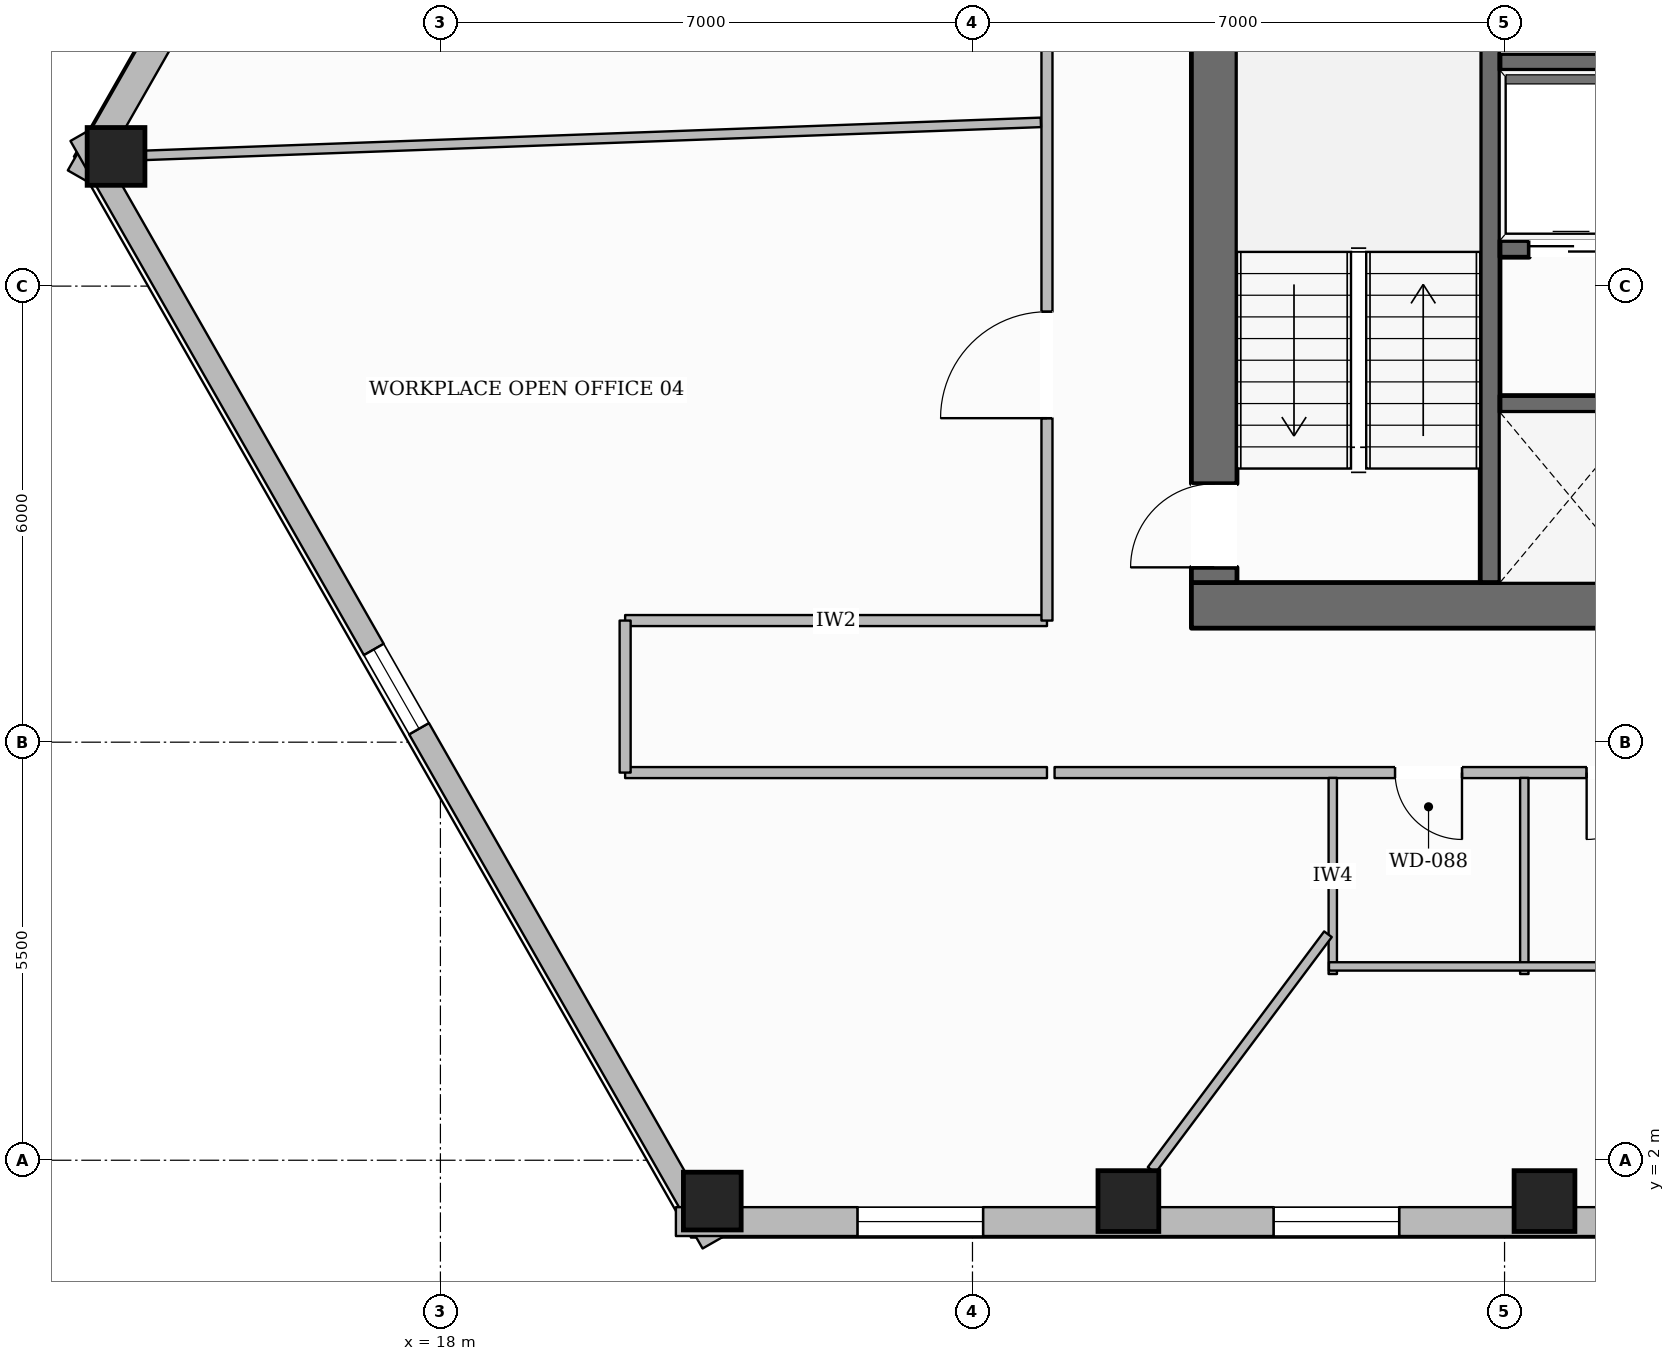
"""IFC4 building model, lengths in metres.
Left out: names, types, materials, properties, quantities, classifications, styles, units other than length and angle.
Written with IfcOpenShell. Run it as: python <this file> out.ifc"""

import sys

from ifc_helpers import new_model, si_unit, direction, frame, frame_2d, origin, origin_2d, place, context, subcontext, project, spatial, rectangle, hollow_rectangle, extrude, element, fill, save


model = new_model("IFC4")
c1 = context("Model", 3, precision=1e-05, world=origin(), true_north=direction((0.0, 1.0)))
c2 = subcontext(c1, "Body", "Model", "MODEL_VIEW")
j1 = project(units=[si_unit("LENGTHUNIT", "METRE"), si_unit("PLANEANGLEUNIT", "RADIAN")], contexts=[c1])
p1 = place(None, origin())
s1 = spatial("IfcSite", under=j1, at=p1, CompositionType="ELEMENT")
p2 = place(p1, origin())
s2 = spatial("IfcBuilding", under=s1, at=p2, CompositionType="ELEMENT")
p3 = place(p2, frame((0.0, 0.0, 25.25)))
s3 = spatial("IfcBuildingStorey", under=s2, at=p3, CompositionType="ELEMENT", Elevation=25.25)
p4 = place(p3, frame((27.88, 9.3, 0.0), z_axis=(0.0, 0.0, 1.0), x_axis=(1.0, 0.0, 0.0)))
e1 = element("IfcWall", 1, at=p4, inside=s3, PredefinedType="SOLIDWALL", context=c2, shape_type="SweptSolid", body=[
    extrude(rectangle(XDim=20.24, YDim=0.6, at=frame_2d((10.12, 0.0))), origin(), (0.0, 0.0, 1.0), 3.59),
])
p5 = place(p4, frame((10.62, 0.0, 0.0)))
e2 = element("IfcOpeningElement", 2, at=p5, cuts=e1, PredefinedType="OPENING", context=c2, shape_type="SweptSolid", body=[
    extrude(rectangle(XDim=1.4, YDim=2.2, at=frame_2d((0.7, 1.1))), frame((0.0, 0.31, 0.0), z_axis=(0.0, -1.0, 0.0), x_axis=(1.0, 0.0, 0.0)), (0.0, 0.0, 1.0), 0.62),
])
p6 = place(p3, frame((28.18, 9.6, 0.0), z_axis=(0.0, 0.0, 1.0), x_axis=(0.0, 1.0, 0.0)))
e3 = element("IfcWall", 3, at=p6, inside=s3, PredefinedType="SOLIDWALL", context=c2, shape_type="SweptSolid", body=[
    extrude(rectangle(XDim=13.0, YDim=0.6, at=frame_2d((6.5, 0.0))), origin(), (0.0, 0.0, 1.0), 3.59),
])
p7 = place(p6, frame((0.2, 0.0, 0.0)))
e4 = element("IfcOpeningElement", 4, at=p7, cuts=e3, PredefinedType="OPENING", context=c2, shape_type="SweptSolid", body=[
    extrude(rectangle(XDim=1.1, YDim=2.15, at=frame_2d((0.55, 1.075))), frame((0.0, 0.31, 0.0), z_axis=(0.0, -1.0, 0.0), x_axis=(1.0, 0.0, 0.0)), (0.0, 0.0, 1.0), 0.62),
])
p8 = place(p6, frame((8.4, 0.0, 0.0)))
e5 = element("IfcOpeningElement", 5, at=p8, cuts=e3, PredefinedType="OPENING", context=c2, shape_type="SweptSolid", body=[
    extrude(rectangle(XDim=0.9, YDim=2.1, at=frame_2d((0.45, 1.05))), frame((0.0, 0.31, 0.0), z_axis=(0.0, -1.0, 0.0), x_axis=(1.0, 0.0, 0.0)), (0.0, 0.0, 1.0), 0.62),
])
p9 = place(p3, frame((31.81, 9.6, 0.0), z_axis=(0.0, 0.0, 1.0), x_axis=(0.0, 1.0, 0.0)))
e6 = element("IfcWall", 6, at=p9, inside=s3, PredefinedType="SHEAR", context=c2, shape_type="SweptSolid", body=[
    extrude(rectangle(XDim=13.0, YDim=0.26, at=frame_2d((6.5, 0.0))), origin(), (0.0, 0.0, 1.0), 3.59),
])
p10 = place(p9, frame((10.925, 0.0, 0.0)))
e7 = element("IfcOpeningElement", 7, at=p10, cuts=e6, PredefinedType="OPENING", context=c2, shape_type="SweptSolid", body=[
    extrude(rectangle(XDim=1.25, YDim=2.25, at=frame_2d((0.625, 1.125))), frame((0.0, 0.14, 0.0), z_axis=(0.0, -1.0, 0.0), x_axis=(1.0, 0.0, 0.0)), (0.0, 0.0, 1.0), 0.28),
])
p11 = place(p3, frame((31.94, 16.45, 0.0), z_axis=(0.0, 0.0, 1.0), x_axis=(1.0, 0.0, 0.0)))
e8 = element("IfcWall", 8, at=p11, inside=s3, PredefinedType="SOLIDWALL", context=c2, shape_type="SweptSolid", body=[
    extrude(rectangle(XDim=12.12, YDim=0.22, at=frame_2d((6.06, 0.0))), origin(), (0.0, 0.0, 1.0), 3.59),
])
p12 = place(p3, frame((31.94, 13.99, 0.0), z_axis=(0.0, 0.0, 1.0), x_axis=(1.0, 0.0, 0.0)))
e9 = element("IfcWall", 9, at=p12, inside=s3, PredefinedType="SOLIDWALL", context=c2, shape_type="SweptSolid", body=[
    extrude(rectangle(XDim=12.12, YDim=0.22, at=frame_2d((6.06, 0.0))), origin(), (0.0, 0.0, 1.0), 3.59),
])
p13 = place(p12, frame((0.385, 0.0, 0.0)))
e10 = element("IfcOpeningElement", 10, at=p13, cuts=e9, PredefinedType="OPENING", context=c2, shape_type="SweptSolid", body=[
    extrude(rectangle(XDim=1.1, YDim=2.2, at=frame_2d((0.55, 1.1))), frame((0.0, 0.12, 0.0), z_axis=(0.0, -1.0, 0.0), x_axis=(1.0, 0.0, 0.0)), (0.0, 0.0, 1.0), 0.24),
])
p14 = place(p12, frame((2.435, 0.0, 0.0)))
e11 = element("IfcOpeningElement", 11, at=p14, cuts=e9, PredefinedType="OPENING", context=c2, shape_type="SweptSolid", body=[
    extrude(rectangle(XDim=1.1, YDim=2.2, at=frame_2d((0.55, 1.1))), frame((0.0, 0.12, 0.0), z_axis=(0.0, -1.0, 0.0), x_axis=(1.0, 0.0, 0.0)), (0.0, 0.0, 1.0), 0.24),
])
p15 = place(p12, frame((4.485, 0.0, 0.0)))
e12 = element("IfcOpeningElement", 12, at=p15, cuts=e9, PredefinedType="OPENING", context=c2, shape_type="SweptSolid", body=[
    extrude(rectangle(XDim=1.1, YDim=2.2, at=frame_2d((0.55, 1.1))), frame((0.0, 0.12, 0.0), z_axis=(0.0, -1.0, 0.0), x_axis=(1.0, 0.0, 0.0)), (0.0, 0.0, 1.0), 0.24),
])
p16 = place(p3, frame((31.94, 11.95, 0.0), z_axis=(0.0, 0.0, 1.0), x_axis=(1.0, 0.0, 0.0)))
e13 = element("IfcWall", 13, at=p16, inside=s3, PredefinedType="SOLIDWALL", context=c2, shape_type="SweptSolid", body=[
    extrude(rectangle(XDim=6.19, YDim=0.22, at=frame_2d((3.095, 0.0))), origin(), (0.0, 0.0, 1.0), 3.59),
])
for number, where, z_axis, x_axis in (
    (14, (13.733, 15.206, 0.0), (0.0, 0.0, 1.0), (1.0, 0.0, 0.0)),
    (15, (21.577, 1.463, 0.0), (0.0, 0.0, 1.0), (1.0, 0.0, 0.0)),
):
    element("IfcColumn", number, at=place(p3, frame(where, z_axis=z_axis, x_axis=x_axis)), inside=s3, PredefinedType="COLUMN", context=c2, shape_type="SweptSolid", body=[
        extrude(hollow_rectangle(XDim=0.76, YDim=0.76, WallThickness=0.035, at=origin_2d()), origin(), (0.0, 0.0, 1.0), 3.59),
    ])
for number, where, z_axis, x_axis in (
    (16, (27.051, 1.463, 0.0), (0.0, 0.0, 1.0), (1.0, 0.0, 0.0)),
    (17, (32.526, 1.463, 0.0), (0.0, 0.0, 1.0), (1.0, 0.0, 0.0)),
):
    element("IfcColumn", number, at=place(p3, frame(where, z_axis=z_axis, x_axis=x_axis)), inside=s3, PredefinedType="COLUMN", context=c2, shape_type="SweptSolid", body=[
        extrude(hollow_rectangle(XDim=0.8, YDim=0.8, WallThickness=0.036, at=origin_2d()), origin(), (0.0, 0.0, 1.0), 3.59),
    ])
p17 = place(p3, frame((13.263, 14.928, 0.0), z_axis=(0.0, 0.0, 1.0), x_axis=(0.495711630902, 0.868487178367, 0.0)))
e18 = element("IfcWall", 18, at=p17, inside=s3, PredefinedType="STANDARD", context=c2, shape_type="SweptSolid", body=[
    extrude(rectangle(XDim=34.092, YDim=0.38, at=frame_2d((17.046, 0.0))), origin(), (0.0, 0.0, 1.0), 2.97),
])
p18 = place(p17, frame((30.027, 0.0, 0.65)))
e19 = element("IfcOpeningElement", 19, at=p18, cuts=e18, PredefinedType="OPENING", context=c2, shape_type="SweptSolid", body=[
    extrude(rectangle(XDim=1.65, YDim=1.75, at=frame_2d((0.825, 0.875))), frame((0.0, 0.2, 0.0), z_axis=(0.0, -1.0, 0.0), x_axis=(1.0, 0.0, 0.0)), (0.0, 0.0, 1.0), 0.4),
])
p19 = place(p17, frame((24.504, 0.0, 0.65)))
e20 = element("IfcOpeningElement", 20, at=p19, cuts=e18, PredefinedType="OPENING", context=c2, shape_type="SweptSolid", body=[
    extrude(rectangle(XDim=1.65, YDim=1.75, at=frame_2d((0.825, 0.875))), frame((0.0, 0.2, 0.0), z_axis=(0.0, -1.0, 0.0), x_axis=(1.0, 0.0, 0.0)), (0.0, 0.0, 1.0), 0.4),
])
p20 = place(p17, frame((13.457, 0.0, 0.65)))
e21 = element("IfcOpeningElement", 21, at=p20, cuts=e18, PredefinedType="OPENING", context=c2, shape_type="SweptSolid", body=[
    extrude(rectangle(XDim=1.65, YDim=1.75, at=frame_2d((0.825, 0.875))), frame((0.0, 0.2, 0.0), z_axis=(0.0, -1.0, 0.0), x_axis=(1.0, 0.0, 0.0)), (0.0, 0.0, 1.0), 0.4),
])
p21 = place(p17, frame((7.934, 0.0, 0.65)))
e22 = element("IfcOpeningElement", 22, at=p21, cuts=e18, PredefinedType="OPENING", context=c2, shape_type="SweptSolid", body=[
    extrude(rectangle(XDim=1.65, YDim=1.75, at=frame_2d((0.825, 0.875))), frame((0.0, 0.2, 0.0), z_axis=(0.0, -1.0, 0.0), x_axis=(1.0, 0.0, 0.0)), (0.0, 0.0, 1.0), 0.4),
])
p22 = place(p17, frame((2.411, 0.0, 0.65)))
e23 = element("IfcOpeningElement", 23, at=p22, cuts=e18, PredefinedType="OPENING", context=c2, shape_type="SweptSolid", body=[
    extrude(rectangle(XDim=1.65, YDim=1.75, at=frame_2d((0.825, 0.875))), frame((0.0, 0.2, 0.0), z_axis=(0.0, -1.0, 0.0), x_axis=(1.0, 0.0, 0.0)), (0.0, 0.0, 1.0), 0.4),
])
p23 = place(p3, frame((21.58, 0.913, 0.0), z_axis=(0.0, 0.0, 1.0), x_axis=(-0.495706340457, 0.868490198005, 0.0)))
e24 = element("IfcWall", 24, at=p23, inside=s3, PredefinedType="STANDARD", context=c2, shape_type="SweptSolid", body=[
    extrude(rectangle(XDim=16.777, YDim=0.3, at=frame_2d((8.388, 0.0))), origin(), (0.0, 0.0, 1.0), 2.97),
])
p24 = place(p23, frame((7.789, 0.0, 0.65)))
e25 = element("IfcOpeningElement", 25, at=p24, cuts=e24, PredefinedType="OPENING", context=c2, shape_type="SweptSolid", body=[
    extrude(rectangle(XDim=1.2, YDim=1.7, at=frame_2d((0.6, 0.85))), frame((0.0, 0.16, 0.0), z_axis=(0.0, -1.0, 0.0), x_axis=(1.0, 0.0, 0.0)), (0.0, 0.0, 1.0), 0.32),
])
p25 = place(p3, frame((54.902, 1.193, 0.0), z_axis=(0.0, 0.0, 1.0), x_axis=(-1.0, 0.0, 0.0)))
e26 = element("IfcWall", 26, at=p25, inside=s3, PredefinedType="STANDARD", context=c2, shape_type="SweptSolid", body=[
    extrude(rectangle(XDim=33.804, YDim=0.38, at=frame_2d((16.902, 0.0))), origin(), (0.0, 0.0, 1.0), 2.97),
])
p26 = place(p25, frame((29.763, 0.0, 0.65)))
e27 = element("IfcOpeningElement", 27, at=p26, cuts=e26, PredefinedType="OPENING", context=c2, shape_type="SweptSolid", body=[
    extrude(rectangle(XDim=1.65, YDim=1.75, at=frame_2d((0.825, 0.875))), frame((0.0, 0.2, 0.0), z_axis=(0.0, -1.0, 0.0), x_axis=(1.0, 0.0, 0.0)), (0.0, 0.0, 1.0), 0.4),
])
p27 = place(p25, frame((24.288, 0.0, 0.65)))
e28 = element("IfcOpeningElement", 28, at=p27, cuts=e26, PredefinedType="OPENING", context=c2, shape_type="SweptSolid", body=[
    extrude(rectangle(XDim=1.65, YDim=1.75, at=frame_2d((0.825, 0.875))), frame((0.0, 0.2, 0.0), z_axis=(0.0, -1.0, 0.0), x_axis=(1.0, 0.0, 0.0)), (0.0, 0.0, 1.0), 0.4),
])
p28 = place(p25, frame((13.34, 0.0, 0.65)))
e29 = element("IfcOpeningElement", 29, at=p28, cuts=e26, PredefinedType="OPENING", context=c2, shape_type="SweptSolid", body=[
    extrude(rectangle(XDim=1.65, YDim=1.75, at=frame_2d((0.825, 0.875))), frame((0.0, 0.2, 0.0), z_axis=(0.0, -1.0, 0.0), x_axis=(1.0, 0.0, 0.0)), (0.0, 0.0, 1.0), 0.4),
])
p29 = place(p25, frame((7.865, 0.0, 0.65)))
e30 = element("IfcOpeningElement", 30, at=p29, cuts=e26, PredefinedType="OPENING", context=c2, shape_type="SweptSolid", body=[
    extrude(rectangle(XDim=1.65, YDim=1.75, at=frame_2d((0.825, 0.875))), frame((0.0, 0.2, 0.0), z_axis=(0.0, -1.0, 0.0), x_axis=(1.0, 0.0, 0.0)), (0.0, 0.0, 1.0), 0.4),
])
p30 = place(p25, frame((2.391, 0.0, 0.65)))
e31 = element("IfcOpeningElement", 31, at=p30, cuts=e26, PredefinedType="OPENING", context=c2, shape_type="SweptSolid", body=[
    extrude(rectangle(XDim=1.65, YDim=1.75, at=frame_2d((0.825, 0.875))), frame((0.0, 0.2, 0.0), z_axis=(0.0, -1.0, 0.0), x_axis=(1.0, 0.0, 0.0)), (0.0, 0.0, 1.0), 0.4),
])
p31 = place(p3, frame((20.43, 9.1, 0.0), z_axis=(0.0, 0.0, 1.0), x_axis=(1.0, 0.0, 0.0)))
e32 = element("IfcWall", 32, at=p31, inside=s3, PredefinedType="PARTITIONING", context=c2, shape_type="SweptSolid", body=[
    extrude(rectangle(XDim=5.55, YDim=0.145, at=frame_2d((2.775, 0.0))), origin(), (0.0, 0.0, 1.0), 3.59),
])
p32 = place(p3, frame((25.98, 9.1, 0.0), z_axis=(0.0, 0.0, 1.0), x_axis=(0.0, 1.0, 0.0)))
e33 = element("IfcWall", 33, at=p32, inside=s3, PredefinedType="PARTITIONING", context=c2, shape_type="SweptSolid", body=[
    extrude(rectangle(XDim=16.0, YDim=0.145, at=frame_2d((8.0, 0.0))), origin(), (0.0, 0.0, 1.0), 3.278),
])
p33 = place(p32, frame((10.491, 0.0, 0.0)))
e34 = element("IfcOpeningElement", 34, at=p33, cuts=e33, PredefinedType="OPENING", context=c2, shape_type="SweptSolid", body=[
    extrude(rectangle(XDim=1.4, YDim=2.2, at=frame_2d((0.7, 1.1))), frame((0.0, 0.083, 0.0), z_axis=(0.0, -1.0, 0.0), x_axis=(1.0, 0.0, 0.0)), (0.0, 0.0, 1.0), 0.165),
])
p34 = place(p32, frame((2.663, 0.0, 0.0)))
e35 = element("IfcOpeningElement", 35, at=p34, cuts=e33, PredefinedType="OPENING", context=c2, shape_type="SweptSolid", body=[
    extrude(rectangle(XDim=1.4, YDim=2.2, at=frame_2d((0.7, 1.1))), frame((0.0, 0.083, 0.0), z_axis=(0.0, -1.0, 0.0), x_axis=(1.0, 0.0, 0.0)), (0.0, 0.0, 1.0), 0.165),
])
p35 = place(p3, frame((49.92, 7.1, 0.0), z_axis=(0.0, 0.0, 1.0), x_axis=(-1.0, 0.0, 0.0)))
e36 = element("IfcWall", 36, at=p35, inside=s3, PredefinedType="PARTITIONING", context=c2, shape_type="SweptSolid", body=[
    extrude(rectangle(XDim=23.84, YDim=0.145, at=frame_2d((11.92, 0.0))), origin(), (0.0, 0.0, 1.0), 3.278),
])
p36 = place(p35, frame((18.48, 0.0, 0.0)))
e37 = element("IfcOpeningElement", 37, at=p36, cuts=e36, PredefinedType="OPENING", context=c2, shape_type="SweptSolid", body=[
    extrude(rectangle(XDim=0.88, YDim=2.1, at=frame_2d((0.44, 1.05))), frame((0.0, 0.083, 0.0), z_axis=(0.0, -1.0, 0.0), x_axis=(1.0, 0.0, 0.0)), (0.0, 0.0, 1.0), 0.165),
])
p37 = place(p35, frame((15.96, 0.0, 0.0)))
e38 = element("IfcOpeningElement", 38, at=p37, cuts=e36, PredefinedType="OPENING", context=c2, shape_type="SweptSolid", body=[
    extrude(rectangle(XDim=0.88, YDim=2.1, at=frame_2d((0.44, 1.05))), frame((0.0, 0.083, 0.0), z_axis=(0.0, -1.0, 0.0), x_axis=(1.0, 0.0, 0.0)), (0.0, 0.0, 1.0), 0.165),
])
p38 = place(p35, frame((13.5, 0.0, 0.0)))
e39 = element("IfcOpeningElement", 39, at=p38, cuts=e36, PredefinedType="OPENING", context=c2, shape_type="SweptSolid", body=[
    extrude(rectangle(XDim=0.96, YDim=2.1, at=frame_2d((0.48, 1.05))), frame((0.0, 0.083, 0.0), z_axis=(0.0, -1.0, 0.0), x_axis=(1.0, 0.0, 0.0)), (0.0, 0.0, 1.0), 0.165),
])
p39 = place(p35, frame((8.311, 0.0, 0.0)))
e40 = element("IfcOpeningElement", 40, at=p39, cuts=e36, PredefinedType="OPENING", context=c2, shape_type="SweptSolid", body=[
    extrude(rectangle(XDim=1.4, YDim=2.2, at=frame_2d((0.7, 1.1))), frame((0.0, 0.083, 0.0), z_axis=(0.0, -1.0, 0.0), x_axis=(1.0, 0.0, 0.0)), (0.0, 0.0, 1.0), 0.165),
])
p40 = place(p3, frame((25.98, 7.1, 0.0), z_axis=(0.0, 0.0, 1.0), x_axis=(-1.0, 0.0, 0.0)))
e41 = element("IfcWall", 41, at=p40, inside=s3, PredefinedType="PARTITIONING", context=c2, shape_type="SweptSolid", body=[
    extrude(rectangle(XDim=5.55, YDim=0.145, at=frame_2d((2.775, 0.0))), origin(), (0.0, 0.0, 1.0), 3.59),
])
p41 = place(p3, frame((20.43, 7.1, 0.0), z_axis=(0.0, 0.0, 1.0), x_axis=(0.0, 1.0, 0.0)))
e42 = element("IfcWall", 42, at=p41, inside=s3, PredefinedType="PARTITIONING", context=c2, shape_type="SweptSolid", body=[
    extrude(rectangle(XDim=2.0, YDim=0.145, at=frame_2d((1.0, 0.0))), origin(), (0.0, 0.0, 1.0), 3.59),
])
for number, where, z_axis, x_axis in (
    (43, (29.74, 4.45, 0.0), (0.0, 0.0, 1.0), (0.0, 1.0, 0.0)),
    (44, (32.26, 4.45, 0.0), (0.0, 0.0, 1.0), (0.0, 1.0, 0.0)),
):
    element("IfcWall", number, at=place(p3, frame(where, z_axis=z_axis, x_axis=x_axis)), inside=s3, PredefinedType="PLUMBINGWALL", context=c2, shape_type="SweptSolid", body=[
        extrude(rectangle(XDim=2.58, YDim=0.11, at=frame_2d((1.29, 0.0))), origin(), (0.0, 0.0, 1.0), 3.59),
    ])
p42 = place(p3, frame((29.69, 4.55, 0.0), z_axis=(0.0, 0.0, 1.0), x_axis=(1.0, 0.0, 0.0)))
e45 = element("IfcWall", 45, at=p42, inside=s3, PredefinedType="PLUMBINGWALL", context=c2, shape_type="SweptSolid", body=[
    extrude(rectangle(XDim=7.46, YDim=0.11, at=frame_2d((3.73, 0.0))), origin(), (0.0, 0.0, 1.0), 3.59),
])
p43 = place(p3, frame((25.899, 15.654, 0.0), z_axis=(0.0, 0.0, 1.0), x_axis=(-0.999322388706, -0.036807111154, 0.0)))
e46 = element("IfcWall", 46, at=p43, inside=s3, PredefinedType="PARTITIONING", context=c2, shape_type="SweptSolid", body=[
    extrude(rectangle(XDim=11.787, YDim=0.125, at=frame_2d((5.894, 0.0))), origin(), (0.0, 0.0, 1.0), 3.057),
])
p44 = place(p3, frame((29.677, 4.973, 0.0), z_axis=(0.0, 0.0, 1.0), x_axis=(-0.598981151393, -0.800763123699, 0.0)))
e47 = element("IfcWall", 47, at=p44, inside=s3, PredefinedType="PARTITIONING", context=c2, shape_type="SweptSolid", body=[
    extrude(rectangle(XDim=3.874, YDim=0.125, at=frame_2d((1.937, 0.0))), origin(), (0.0, 0.0, 1.0), 3.59),
])
p45 = place(p26, origin())
e48 = element("IfcWindow", 48, at=p45, inside=s3, PartitioningType="SINGLE_PANEL", PredefinedType="WINDOW", context=c2, shape_type="SweptSolid", body=[
    extrude(rectangle(XDim=1.65, YDim=1.75, at=frame_2d((0.825, 0.875))), frame((0.0, 0.03, 0.0), z_axis=(0.0, -1.0, 0.0), x_axis=(1.0, 0.0, 0.0)), (0.0, 0.0, 1.0), 0.06),
])
fill(e27, e48)
p46 = place(p27, origin())
e49 = element("IfcWindow", 49, at=p46, inside=s3, PartitioningType="SINGLE_PANEL", PredefinedType="WINDOW", context=c2, shape_type="SweptSolid", body=[
    extrude(rectangle(XDim=1.65, YDim=1.75, at=frame_2d((0.825, 0.875))), frame((0.0, 0.03, 0.0), z_axis=(0.0, -1.0, 0.0), x_axis=(1.0, 0.0, 0.0)), (0.0, 0.0, 1.0), 0.06),
])
fill(e28, e49)
p47 = place(p24, origin())
e50 = element("IfcWindow", 50, at=p47, inside=s3, PartitioningType="SINGLE_PANEL", PredefinedType="WINDOW", context=c2, shape_type="SweptSolid", body=[
    extrude(rectangle(XDim=1.2, YDim=1.7, at=frame_2d((0.6, 0.85))), frame((0.0, 0.03, 0.0), z_axis=(0.0, -1.0, 0.0), x_axis=(1.0, 0.0, 0.0)), (0.0, 0.0, 1.0), 0.06),
])
fill(e25, e50)
p48 = place(p7, origin())
e51 = element("IfcDoor", 51, at=p48, inside=s3, OperationType="SINGLE_SWING_LEFT", PredefinedType="DOOR", context=c2, shape_type="SweptSolid", body=[
    extrude(rectangle(XDim=1.1, YDim=2.15, at=frame_2d((0.55, 1.075))), frame((0.0, 0.025, 0.0), z_axis=(0.0, -1.0, 0.0), x_axis=(1.0, 0.0, 0.0)), (0.0, 0.0, 1.0), 0.05),
])
fill(e4, e51)
p49 = place(p13, origin())
e52 = element("IfcDoor", 52, at=p49, inside=s3, OperationType="DOUBLE_DOOR_SLIDING", PredefinedType="DOOR", context=c2, shape_type="SweptSolid", body=[
    extrude(rectangle(XDim=1.1, YDim=2.2, at=frame_2d((0.55, 1.1))), frame((0.0, 0.025, 0.0), z_axis=(0.0, -1.0, 0.0), x_axis=(1.0, 0.0, 0.0)), (0.0, 0.0, 1.0), 0.05),
])
fill(e10, e52)
p50 = place(p36, origin())
e53 = element("IfcDoor", 53, at=p50, inside=s3, OperationType="SINGLE_SWING_LEFT", PredefinedType="DOOR", context=c2, shape_type="SweptSolid", body=[
    extrude(rectangle(XDim=0.88, YDim=2.1, at=frame_2d((0.44, 1.05))), frame((0.0, 0.025, 0.0), z_axis=(0.0, -1.0, 0.0), x_axis=(1.0, 0.0, 0.0)), (0.0, 0.0, 1.0), 0.05),
])
fill(e37, e53)
p51 = place(p37, origin())
e54 = element("IfcDoor", 54, at=p51, inside=s3, OperationType="SINGLE_SWING_RIGHT", PredefinedType="DOOR", context=c2, shape_type="SweptSolid", body=[
    extrude(rectangle(XDim=0.88, YDim=2.1, at=frame_2d((0.44, 1.05))), frame((0.0, 0.025, 0.0), z_axis=(0.0, -1.0, 0.0), x_axis=(1.0, 0.0, 0.0)), (0.0, 0.0, 1.0), 0.05),
])
fill(e38, e54)
p52 = place(p34, origin())
e55 = element("IfcDoor", 55, at=p52, inside=s3, OperationType="SINGLE_SWING_LEFT", PredefinedType="DOOR", context=c2, shape_type="SweptSolid", body=[
    extrude(rectangle(XDim=1.4, YDim=2.2, at=frame_2d((0.7, 1.1))), frame((0.0, 0.025, 0.0), z_axis=(0.0, -1.0, 0.0), x_axis=(1.0, 0.0, 0.0)), (0.0, 0.0, 1.0), 0.05),
])
fill(e35, e55)
save(model, sys.argv[1])
